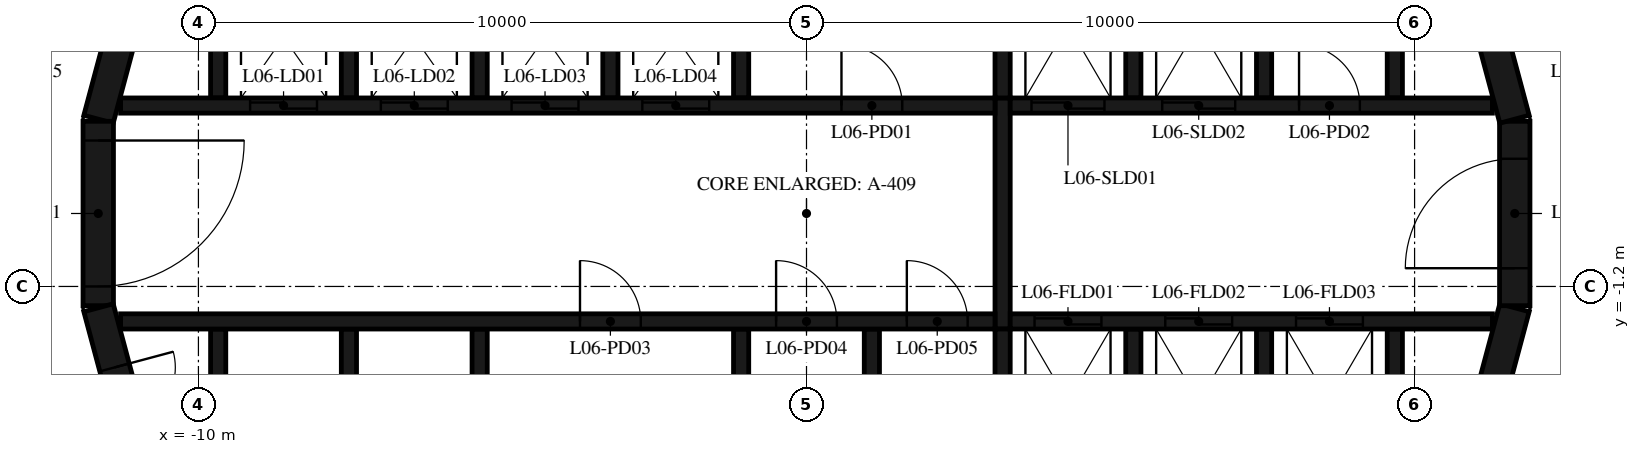
"""IFC4 building model, lengths in metres.
Left out: names, types, materials, properties, quantities, classifications, styles, units other than length and angle.
Written with IfcOpenShell. Run it as: python <this file> out.ifc"""

import sys

from ifc_helpers import new_model, si_unit, direction, frame, frame_2d, origin, place, context, subcontext, project, spatial, polyline, rectangle, outline, extrude, element, fill, save


model = new_model("IFC4")
c1 = context("Model", 3, precision=1e-05, world=origin(), true_north=direction((0.0, 1.0)))
c2 = subcontext(c1, "Body", "Model", "MODEL_VIEW")
j1 = project(units=[si_unit("LENGTHUNIT", "METRE"), si_unit("PLANEANGLEUNIT", "RADIAN")], contexts=[c1])
p1 = place(None, origin())
s1 = spatial("IfcSite", under=j1, at=p1, CompositionType="ELEMENT")
p2 = place(p1, origin())
s2 = spatial("IfcBuilding", under=s1, at=p2, CompositionType="ELEMENT")
p3 = place(p2, frame((0.0, 0.0, 33.0)))
s3 = spatial("IfcBuildingStorey", under=s2, at=p3, CompositionType="ELEMENT", Elevation=33.0)
p4 = place(p3, frame((10.858, -4.479, 0.0), z_axis=(0.0, 0.0, 1.0), x_axis=(0.258734743916, 0.965948410781, 0.0)))
e1 = element("IfcWall", 1, at=p4, inside=s3, PredefinedType="SHEAR", context=c2, shape_type="SweptSolid", body=[
    extrude(rectangle(XDim=3.033, YDim=0.5, at=frame_2d((1.516, 0.0))), origin(), (0.0, 0.0, 1.0), 4.95),
])
p5 = place(p3, frame((11.647, -1.516, 0.0), z_axis=(0.0, 0.0, 1.0), x_axis=(0.0, 1.0, 0.0)))
e2 = element("IfcWall", 2, at=p5, inside=s3, PredefinedType="SHEAR", context=c2, shape_type="SweptSolid", body=[
    extrude(rectangle(XDim=3.033, YDim=0.5, at=frame_2d((1.516, 0.0))), origin(), (0.0, 0.0, 1.0), 4.95),
])
p6 = place(p5, frame((0.616, 0.0, 0.0)))
e3 = element("IfcOpeningElement", 3, at=p6, cuts=e2, PredefinedType="OPENING", context=c2, shape_type="SweptSolid", body=[
    extrude(rectangle(XDim=1.8, YDim=2.1, at=frame_2d((0.9, 1.05))), frame((0.0, 0.26, 0.0), z_axis=(0.0, -1.0, 0.0), x_axis=(1.0, 0.0, 0.0)), (0.0, 0.0, 1.0), 0.52),
])
for number, where, z_axis, x_axis in (
    (4, (11.643, 1.55, 0.0), (0.0, 0.0, 1.0), (-0.259, 0.966, 0.0)),
    (5, (-10.858, 4.479, 0.0), (0.0, 0.0, 1.0), (-0.259, -0.966, 0.0)),
):
    element("IfcWall", number, at=place(p3, frame(where, z_axis=z_axis, x_axis=x_axis)), inside=s3, PredefinedType="SHEAR", context=c2, shape_type="SweptSolid", body=[
        extrude(rectangle(XDim=3.033, YDim=0.5, at=frame_2d((1.516, 0.0))), origin(), (0.0, 0.0, 1.0), 4.95),
    ])
p7 = place(p3, frame((-11.647, 1.516, 0.0), z_axis=(0.0, 0.0, 1.0), x_axis=(0.0, -1.0, 0.0)))
e6 = element("IfcWall", 6, at=p7, inside=s3, PredefinedType="SHEAR", context=c2, shape_type="SweptSolid", body=[
    extrude(rectangle(XDim=3.033, YDim=0.5, at=frame_2d((1.516, 0.0))), origin(), (0.0, 0.0, 1.0), 4.95),
])
p8 = place(p7, frame((0.316, 0.0, 0.0)))
e7 = element("IfcOpeningElement", 7, at=p8, cuts=e6, PredefinedType="OPENING", context=c2, shape_type="SweptSolid", body=[
    extrude(rectangle(XDim=2.4, YDim=2.1, at=frame_2d((1.2, 1.05))), frame((0.0, 0.26, 0.0), z_axis=(0.0, -1.0, 0.0), x_axis=(1.0, 0.0, 0.0)), (0.0, 0.0, 1.0), 0.52),
])
p9 = place(p3, frame((-11.643, -1.55, 0.0), z_axis=(0.0, 0.0, 1.0), x_axis=(0.258734743916, -0.965948410781, 0.0)))
e8 = element("IfcWall", 8, at=p9, inside=s3, PredefinedType="SHEAR", context=c2, shape_type="SweptSolid", body=[
    extrude(rectangle(XDim=3.033, YDim=0.5, at=frame_2d((1.516, 0.0))), origin(), (0.0, 0.0, 1.0), 4.95),
])
p10 = place(p9, frame((1.016, 0.0, 0.0)))
e9 = element("IfcOpeningElement", 9, at=p10, cuts=e8, PredefinedType="OPENING", context=c2, shape_type="SweptSolid", body=[
    extrude(rectangle(XDim=1.0, YDim=2.4, at=frame_2d((0.5, 1.2))), frame((0.0, 0.26, 0.0), z_axis=(0.0, -1.0, 0.0), x_axis=(1.0, 0.0, 0.0)), (0.0, 0.0, 1.0), 0.52),
])
p11 = place(p3, origin())
e10 = element("IfcWall", 10, at=p11, inside=s3, PredefinedType="SHEAR", context=c2, shape_type="SweptSolid", body=[
    extrude(outline(polyline([(-9.55, 4.8), (-7.65, 4.8), (-7.65, 1.9), (-7.4, 1.9), (-7.4, 4.8), (-5.5, 4.8), (-5.5, 1.9), (-5.25, 1.9), (-5.25, 4.8), (-3.35, 4.8), (-3.35, 1.9), (-3.1, 1.9), (-3.1, 4.8), (-1.2, 4.8), (-1.2, 1.9), (-0.95, 1.9), (-0.95, 4.8), (3.1, 4.8), (3.1, 1.9), (3.35, 1.9), (3.35, 4.8), (5.25, 4.8), (5.25, 1.9), (5.5, 1.9), (5.5, 4.8), (7.4, 4.8), (7.4, 1.9), (7.65, 1.9), (7.65, 4.8), (9.55, 4.8), (9.55, 1.9), (9.8, 1.9), (9.8, 4.8), (9.8, 5.05), (-9.8, 5.05), (-9.8, 4.8), (-9.8, 1.9), (-9.55, 1.9), (-9.55, 4.8)])), origin(), (0.0, 0.0, 1.0), 4.95),
])
p12 = place(p3, origin())
e11 = element("IfcWall", 11, at=p12, inside=s3, PredefinedType="SHEAR", context=c2, shape_type="SweptSolid", body=[
    extrude(outline(polyline([(9.8, -5.05), (9.8, -4.8), (9.8, -1.9), (9.55, -1.9), (9.55, -4.8), (7.65, -4.8), (7.65, -1.9), (7.4, -1.9), (7.4, -4.8), (5.5, -4.8), (5.5, -1.9), (5.25, -1.9), (5.25, -4.8), (3.35, -4.8), (3.35, -1.9), (3.1, -1.9), (3.1, -4.8), (1.2, -4.8), (1.2, -1.9), (0.95, -1.9), (0.95, -4.8), (-0.95, -4.8), (-0.95, -1.9), (-1.2, -1.9), (-1.2, -4.8), (-5.25, -4.8), (-5.25, -1.9), (-5.5, -1.9), (-5.5, -4.8), (-7.4, -4.8), (-7.4, -1.9), (-7.65, -1.9), (-7.65, -4.8), (-9.55, -4.8), (-9.55, -1.9), (-9.8, -1.9), (-9.8, -4.8), (-9.8, -5.05), (9.8, -5.05)])), origin(), (0.0, 0.0, 1.0), 4.95),
])
p13 = place(p3, frame((-11.28, 1.775, 0.0), z_axis=(0.0, 0.0, 1.0), x_axis=(1.0, 0.0, 0.0)))
e12 = element("IfcWall", 12, at=p13, inside=s3, PredefinedType="SHEAR", context=c2, shape_type="SweptSolid", body=[
    extrude(rectangle(XDim=14.38, YDim=0.25, at=frame_2d((7.19, 0.0))), origin(), (0.0, 0.0, 1.0), 4.95),
])
p14 = place(p13, frame((2.13, 0.0, 0.0)))
e13 = element("IfcOpeningElement", 13, at=p14, cuts=e12, PredefinedType="OPENING", context=c2, shape_type="SweptSolid", body=[
    extrude(rectangle(XDim=1.1, YDim=2.1, at=frame_2d((0.55, 1.05))), frame((0.0, 0.135, 0.0), z_axis=(0.0, -1.0, 0.0), x_axis=(1.0, 0.0, 0.0)), (0.0, 0.0, 1.0), 0.27),
])
p15 = place(p13, frame((4.28, 0.0, 0.0)))
e14 = element("IfcOpeningElement", 14, at=p15, cuts=e12, PredefinedType="OPENING", context=c2, shape_type="SweptSolid", body=[
    extrude(rectangle(XDim=1.1, YDim=2.1, at=frame_2d((0.55, 1.05))), frame((0.0, 0.135, 0.0), z_axis=(0.0, -1.0, 0.0), x_axis=(1.0, 0.0, 0.0)), (0.0, 0.0, 1.0), 0.27),
])
p16 = place(p13, frame((6.43, 0.0, 0.0)))
e15 = element("IfcOpeningElement", 15, at=p16, cuts=e12, PredefinedType="OPENING", context=c2, shape_type="SweptSolid", body=[
    extrude(rectangle(XDim=1.1, YDim=2.1, at=frame_2d((0.55, 1.05))), frame((0.0, 0.135, 0.0), z_axis=(0.0, -1.0, 0.0), x_axis=(1.0, 0.0, 0.0)), (0.0, 0.0, 1.0), 0.27),
])
p17 = place(p13, frame((8.58, 0.0, 0.0)))
e16 = element("IfcOpeningElement", 16, at=p17, cuts=e12, PredefinedType="OPENING", context=c2, shape_type="SweptSolid", body=[
    extrude(rectangle(XDim=1.1, YDim=2.1, at=frame_2d((0.55, 1.05))), frame((0.0, 0.135, 0.0), z_axis=(0.0, -1.0, 0.0), x_axis=(1.0, 0.0, 0.0)), (0.0, 0.0, 1.0), 0.27),
])
p18 = place(p13, frame((11.855, 0.0, 0.0)))
e17 = element("IfcOpeningElement", 17, at=p18, cuts=e12, PredefinedType="OPENING", context=c2, shape_type="SweptSolid", body=[
    extrude(rectangle(XDim=1.0, YDim=2.4, at=frame_2d((0.5, 1.2))), frame((0.0, 0.135, 0.0), z_axis=(0.0, -1.0, 0.0), x_axis=(1.0, 0.0, 0.0)), (0.0, 0.0, 1.0), 0.27),
])
p19 = place(p3, frame((3.35, 1.775, 0.0), z_axis=(0.0, 0.0, 1.0), x_axis=(1.0, 0.0, 0.0)))
e18 = element("IfcWall", 18, at=p19, inside=s3, PredefinedType="SHEAR", context=c2, shape_type="SweptSolid", body=[
    extrude(rectangle(XDim=7.93, YDim=0.25, at=frame_2d((3.965, 0.0))), origin(), (0.0, 0.0, 1.0), 4.95),
])
p20 = place(p19, frame((0.35, 0.0, 0.0)))
e19 = element("IfcOpeningElement", 19, at=p20, cuts=e18, PredefinedType="OPENING", context=c2, shape_type="SweptSolid", body=[
    extrude(rectangle(XDim=1.2, YDim=2.4, at=frame_2d((0.6, 1.2))), frame((0.0, 0.135, 0.0), z_axis=(0.0, -1.0, 0.0), x_axis=(1.0, 0.0, 0.0)), (0.0, 0.0, 1.0), 0.27),
])
p21 = place(p19, frame((2.5, 0.0, 0.0)))
e20 = element("IfcOpeningElement", 20, at=p21, cuts=e18, PredefinedType="OPENING", context=c2, shape_type="SweptSolid", body=[
    extrude(rectangle(XDim=1.2, YDim=2.4, at=frame_2d((0.6, 1.2))), frame((0.0, 0.135, 0.0), z_axis=(0.0, -1.0, 0.0), x_axis=(1.0, 0.0, 0.0)), (0.0, 0.0, 1.0), 0.27),
])
p22 = place(p19, frame((4.75, 0.0, 0.0)))
e21 = element("IfcOpeningElement", 21, at=p22, cuts=e18, PredefinedType="OPENING", context=c2, shape_type="SweptSolid", body=[
    extrude(rectangle(XDim=1.0, YDim=2.4, at=frame_2d((0.5, 1.2))), frame((0.0, 0.135, 0.0), z_axis=(0.0, -1.0, 0.0), x_axis=(1.0, 0.0, 0.0)), (0.0, 0.0, 1.0), 0.27),
])
p23 = place(p3, frame((-11.28, -1.775, 0.0), z_axis=(0.0, 0.0, 1.0), x_axis=(1.0, 0.0, 0.0)))
e22 = element("IfcWall", 22, at=p23, inside=s3, PredefinedType="SHEAR", context=c2, shape_type="SweptSolid", body=[
    extrude(rectangle(XDim=14.38, YDim=0.25, at=frame_2d((7.19, 0.0))), origin(), (0.0, 0.0, 1.0), 4.95),
])
p24 = place(p23, frame((7.555, 0.0, 0.0)))
e23 = element("IfcOpeningElement", 23, at=p24, cuts=e22, PredefinedType="OPENING", context=c2, shape_type="SweptSolid", body=[
    extrude(rectangle(XDim=1.0, YDim=2.4, at=frame_2d((0.5, 1.2))), frame((0.0, 0.135, 0.0), z_axis=(0.0, -1.0, 0.0), x_axis=(1.0, 0.0, 0.0)), (0.0, 0.0, 1.0), 0.27),
])
p25 = place(p23, frame((10.78, 0.0, 0.0)))
e24 = element("IfcOpeningElement", 24, at=p25, cuts=e22, PredefinedType="OPENING", context=c2, shape_type="SweptSolid", body=[
    extrude(rectangle(XDim=1.0, YDim=2.4, at=frame_2d((0.5, 1.2))), frame((0.0, 0.135, 0.0), z_axis=(0.0, -1.0, 0.0), x_axis=(1.0, 0.0, 0.0)), (0.0, 0.0, 1.0), 0.27),
])
p26 = place(p23, frame((12.93, 0.0, 0.0)))
e25 = element("IfcOpeningElement", 25, at=p26, cuts=e22, PredefinedType="OPENING", context=c2, shape_type="SweptSolid", body=[
    extrude(rectangle(XDim=1.0, YDim=2.4, at=frame_2d((0.5, 1.2))), frame((0.0, 0.135, 0.0), z_axis=(0.0, -1.0, 0.0), x_axis=(1.0, 0.0, 0.0)), (0.0, 0.0, 1.0), 0.27),
])
p27 = place(p3, frame((3.35, -1.775, 0.0), z_axis=(0.0, 0.0, 1.0), x_axis=(1.0, 0.0, 0.0)))
e26 = element("IfcWall", 26, at=p27, inside=s3, PredefinedType="SHEAR", context=c2, shape_type="SweptSolid", body=[
    extrude(rectangle(XDim=7.93, YDim=0.25, at=frame_2d((3.965, 0.0))), origin(), (0.0, 0.0, 1.0), 4.95),
])
p28 = place(p27, frame((0.4, 0.0, 0.0)))
e27 = element("IfcOpeningElement", 27, at=p28, cuts=e26, PredefinedType="OPENING", context=c2, shape_type="SweptSolid", body=[
    extrude(rectangle(XDim=1.1, YDim=2.4, at=frame_2d((0.55, 1.2))), frame((0.0, 0.135, 0.0), z_axis=(0.0, -1.0, 0.0), x_axis=(1.0, 0.0, 0.0)), (0.0, 0.0, 1.0), 0.27),
])
p29 = place(p27, frame((2.55, 0.0, 0.0)))
e28 = element("IfcOpeningElement", 28, at=p29, cuts=e26, PredefinedType="OPENING", context=c2, shape_type="SweptSolid", body=[
    extrude(rectangle(XDim=1.1, YDim=2.4, at=frame_2d((0.55, 1.2))), frame((0.0, 0.135, 0.0), z_axis=(0.0, -1.0, 0.0), x_axis=(1.0, 0.0, 0.0)), (0.0, 0.0, 1.0), 0.27),
])
p30 = place(p27, frame((4.7, 0.0, 0.0)))
e29 = element("IfcOpeningElement", 29, at=p30, cuts=e26, PredefinedType="OPENING", context=c2, shape_type="SweptSolid", body=[
    extrude(rectangle(XDim=1.1, YDim=2.4, at=frame_2d((0.55, 1.2))), frame((0.0, 0.135, 0.0), z_axis=(0.0, -1.0, 0.0), x_axis=(1.0, 0.0, 0.0)), (0.0, 0.0, 1.0), 0.27),
])
p31 = place(p3, frame((3.225, -1.9, 0.0), z_axis=(0.0, 0.0, 1.0), x_axis=(0.0, 1.0, 0.0)))
e30 = element("IfcWall", 30, at=p31, inside=s3, PredefinedType="SHEAR", context=c2, shape_type="SweptSolid", body=[
    extrude(rectangle(XDim=3.8, YDim=0.25, at=frame_2d((1.9, 0.0))), origin(), (0.0, 0.0, 1.0), 4.95),
])
p32 = place(p8, origin())
e31 = element("IfcDoor", 31, at=p32, inside=s3, OperationType="DOUBLE_DOOR_SINGLE_SWING", PredefinedType="DOOR", context=c2, shape_type="SweptSolid", body=[
    extrude(rectangle(XDim=2.4, YDim=2.1, at=frame_2d((1.2, 1.05))), frame((0.0, 0.025, 0.0), z_axis=(0.0, -1.0, 0.0), x_axis=(1.0, 0.0, 0.0)), (0.0, 0.0, 1.0), 0.05),
])
fill(e7, e31)
p33 = place(p6, origin())
e32 = element("IfcDoor", 32, at=p33, inside=s3, OperationType="DOUBLE_DOOR_SINGLE_SWING", PredefinedType="DOOR", context=c2, shape_type="SweptSolid", body=[
    extrude(rectangle(XDim=1.8, YDim=2.1, at=frame_2d((0.9, 1.05))), frame((0.0, 0.025, 0.0), z_axis=(0.0, -1.0, 0.0), x_axis=(1.0, 0.0, 0.0)), (0.0, 0.0, 1.0), 0.05),
])
fill(e3, e32)
p34 = place(p14, origin())
e33 = element("IfcDoor", 33, at=p34, inside=s3, OperationType="DOUBLE_DOOR_SLIDING", PredefinedType="DOOR", context=c2, shape_type="SweptSolid", body=[
    extrude(rectangle(XDim=1.1, YDim=2.1, at=frame_2d((0.55, 1.05))), frame((0.0, 0.025, 0.0), z_axis=(0.0, -1.0, 0.0), x_axis=(1.0, 0.0, 0.0)), (0.0, 0.0, 1.0), 0.05),
])
fill(e13, e33)
p35 = place(p15, origin())
e34 = element("IfcDoor", 34, at=p35, inside=s3, OperationType="DOUBLE_DOOR_SLIDING", PredefinedType="DOOR", context=c2, shape_type="SweptSolid", body=[
    extrude(rectangle(XDim=1.1, YDim=2.1, at=frame_2d((0.55, 1.05))), frame((0.0, 0.025, 0.0), z_axis=(0.0, -1.0, 0.0), x_axis=(1.0, 0.0, 0.0)), (0.0, 0.0, 1.0), 0.05),
])
fill(e14, e34)
p36 = place(p16, origin())
e35 = element("IfcDoor", 35, at=p36, inside=s3, OperationType="DOUBLE_DOOR_SLIDING", PredefinedType="DOOR", context=c2, shape_type="SweptSolid", body=[
    extrude(rectangle(XDim=1.1, YDim=2.1, at=frame_2d((0.55, 1.05))), frame((0.0, 0.025, 0.0), z_axis=(0.0, -1.0, 0.0), x_axis=(1.0, 0.0, 0.0)), (0.0, 0.0, 1.0), 0.05),
])
fill(e15, e35)
p37 = place(p17, origin())
e36 = element("IfcDoor", 36, at=p37, inside=s3, OperationType="DOUBLE_DOOR_SLIDING", PredefinedType="DOOR", context=c2, shape_type="SweptSolid", body=[
    extrude(rectangle(XDim=1.1, YDim=2.1, at=frame_2d((0.55, 1.05))), frame((0.0, 0.025, 0.0), z_axis=(0.0, -1.0, 0.0), x_axis=(1.0, 0.0, 0.0)), (0.0, 0.0, 1.0), 0.05),
])
fill(e16, e36)
p38 = place(p20, origin())
e37 = element("IfcDoor", 37, at=p38, inside=s3, OperationType="DOUBLE_DOOR_SLIDING", PredefinedType="DOOR", context=c2, shape_type="SweptSolid", body=[
    extrude(rectangle(XDim=1.2, YDim=2.4, at=frame_2d((0.6, 1.2))), frame((0.0, 0.025, 0.0), z_axis=(0.0, -1.0, 0.0), x_axis=(1.0, 0.0, 0.0)), (0.0, 0.0, 1.0), 0.05),
])
fill(e19, e37)
p39 = place(p21, origin())
e38 = element("IfcDoor", 38, at=p39, inside=s3, OperationType="DOUBLE_DOOR_SLIDING", PredefinedType="DOOR", context=c2, shape_type="SweptSolid", body=[
    extrude(rectangle(XDim=1.2, YDim=2.4, at=frame_2d((0.6, 1.2))), frame((0.0, 0.025, 0.0), z_axis=(0.0, -1.0, 0.0), x_axis=(1.0, 0.0, 0.0)), (0.0, 0.0, 1.0), 0.05),
])
fill(e20, e38)
p40 = place(p28, origin())
e39 = element("IfcDoor", 39, at=p40, inside=s3, OperationType="DOUBLE_DOOR_SLIDING", PredefinedType="DOOR", context=c2, shape_type="SweptSolid", body=[
    extrude(rectangle(XDim=1.1, YDim=2.4, at=frame_2d((0.55, 1.2))), frame((0.0, 0.025, 0.0), z_axis=(0.0, -1.0, 0.0), x_axis=(1.0, 0.0, 0.0)), (0.0, 0.0, 1.0), 0.05),
])
fill(e27, e39)
p41 = place(p29, origin())
e40 = element("IfcDoor", 40, at=p41, inside=s3, OperationType="DOUBLE_DOOR_SLIDING", PredefinedType="DOOR", context=c2, shape_type="SweptSolid", body=[
    extrude(rectangle(XDim=1.1, YDim=2.4, at=frame_2d((0.55, 1.2))), frame((0.0, 0.025, 0.0), z_axis=(0.0, -1.0, 0.0), x_axis=(1.0, 0.0, 0.0)), (0.0, 0.0, 1.0), 0.05),
])
fill(e28, e40)
p42 = place(p30, origin())
e41 = element("IfcDoor", 41, at=p42, inside=s3, OperationType="DOUBLE_DOOR_SLIDING", PredefinedType="DOOR", context=c2, shape_type="SweptSolid", body=[
    extrude(rectangle(XDim=1.1, YDim=2.4, at=frame_2d((0.55, 1.2))), frame((0.0, 0.025, 0.0), z_axis=(0.0, -1.0, 0.0), x_axis=(1.0, 0.0, 0.0)), (0.0, 0.0, 1.0), 0.05),
])
fill(e29, e41)
p43 = place(p18, origin())
e42 = element("IfcDoor", 42, at=p43, inside=s3, OperationType="SINGLE_SWING_RIGHT", PredefinedType="DOOR", context=c2, shape_type="SweptSolid", body=[
    extrude(rectangle(XDim=1.0, YDim=2.4, at=frame_2d((0.5, 1.2))), frame((0.0, 0.025, 0.0), z_axis=(0.0, -1.0, 0.0), x_axis=(1.0, 0.0, 0.0)), (0.0, 0.0, 1.0), 0.05),
])
fill(e17, e42)
p44 = place(p22, origin())
e43 = element("IfcDoor", 43, at=p44, inside=s3, OperationType="SINGLE_SWING_LEFT", PredefinedType="DOOR", context=c2, shape_type="SweptSolid", body=[
    extrude(rectangle(XDim=1.0, YDim=2.4, at=frame_2d((0.5, 1.2))), frame((0.0, 0.025, 0.0), z_axis=(0.0, -1.0, 0.0), x_axis=(1.0, 0.0, 0.0)), (0.0, 0.0, 1.0), 0.05),
])
fill(e21, e43)
p45 = place(p24, origin())
e44 = element("IfcDoor", 44, at=p45, inside=s3, OperationType="SINGLE_SWING_RIGHT", PredefinedType="DOOR", context=c2, shape_type="SweptSolid", body=[
    extrude(rectangle(XDim=1.0, YDim=2.4, at=frame_2d((0.5, 1.2))), frame((0.0, 0.025, 0.0), z_axis=(0.0, -1.0, 0.0), x_axis=(1.0, 0.0, 0.0)), (0.0, 0.0, 1.0), 0.05),
])
fill(e23, e44)
p46 = place(p25, origin())
e45 = element("IfcDoor", 45, at=p46, inside=s3, OperationType="SINGLE_SWING_LEFT", PredefinedType="DOOR", context=c2, shape_type="SweptSolid", body=[
    extrude(rectangle(XDim=1.0, YDim=2.4, at=frame_2d((0.5, 1.2))), frame((0.0, 0.025, 0.0), z_axis=(0.0, -1.0, 0.0), x_axis=(1.0, 0.0, 0.0)), (0.0, 0.0, 1.0), 0.05),
])
fill(e24, e45)
p47 = place(p26, origin())
e46 = element("IfcDoor", 46, at=p47, inside=s3, OperationType="SINGLE_SWING_RIGHT", PredefinedType="DOOR", context=c2, shape_type="SweptSolid", body=[
    extrude(rectangle(XDim=1.0, YDim=2.4, at=frame_2d((0.5, 1.2))), frame((0.0, 0.025, 0.0), z_axis=(0.0, -1.0, 0.0), x_axis=(1.0, 0.0, 0.0)), (0.0, 0.0, 1.0), 0.05),
])
fill(e25, e46)
p48 = place(p10, origin())
e47 = element("IfcDoor", 47, at=p48, inside=s3, OperationType="SINGLE_SWING_LEFT", PredefinedType="DOOR", context=c2, shape_type="SweptSolid", body=[
    extrude(rectangle(XDim=1.0, YDim=2.4, at=frame_2d((0.5, 1.2))), frame((0.0, 0.025, 0.0), z_axis=(0.0, -1.0, 0.0), x_axis=(1.0, 0.0, 0.0)), (0.0, 0.0, 1.0), 0.05),
])
fill(e9, e47)
save(model, sys.argv[1])
